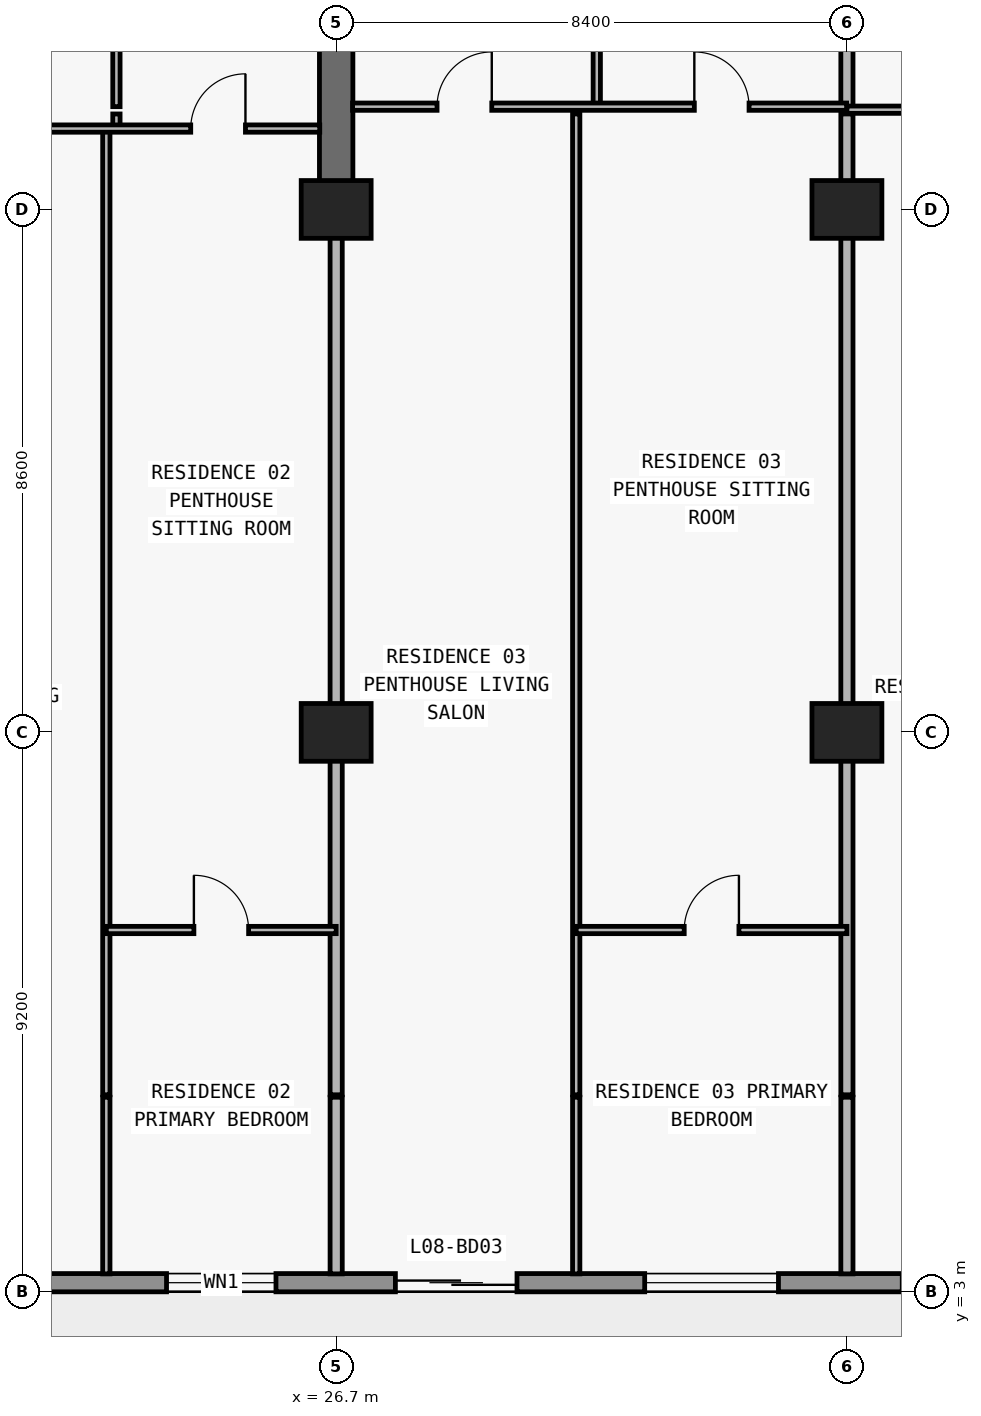
"""IFC4 building model, lengths in metres.
Left out: names, types, materials, properties, quantities, classifications, styles, units other than length and angle.
Written with IfcOpenShell. Run it as: python <this file> out.ifc"""

import sys

from ifc_helpers import new_model, si_unit, direction, frame, frame_2d, origin, origin_2d, place, context, subcontext, project, spatial, rectangle, extrude, element, fill, save


model = new_model("IFC4")
c1 = context("Model", 3, precision=1e-05, world=origin(), true_north=direction((0.0, 1.0)))
c2 = subcontext(c1, "Body", "Model", "MODEL_VIEW")
j1 = project(units=[si_unit("LENGTHUNIT", "METRE"), si_unit("PLANEANGLEUNIT", "RADIAN")], contexts=[c1])
p1 = place(None, origin())
s1 = spatial("IfcSite", under=j1, at=p1, CompositionType="ELEMENT")
p2 = place(p1, origin())
s2 = spatial("IfcBuilding", under=s1, at=p2, CompositionType="ELEMENT")
p3 = place(p2, frame((0.0, 0.0, 36.6)))
s3 = spatial("IfcBuildingStorey", under=s2, at=p3, CompositionType="ELEMENT", Elevation=36.6)
for number, where, z_axis, x_axis in (
    (1, (26.7, 12.2, 0.0), (0.0, 0.0, 1.0), (1.0, 0.0, 0.0)),
    (2, (35.1, 12.2, 0.0), (0.0, 0.0, 1.0), (1.0, 0.0, 0.0)),
    (3, (26.7, 20.8, 0.0), (0.0, 0.0, 1.0), (1.0, 0.0, 0.0)),
    (4, (35.1, 20.8, 0.0), (0.0, 0.0, 1.0), (1.0, 0.0, 0.0)),
):
    element("IfcColumn", number, at=place(p3, frame(where, z_axis=z_axis, x_axis=x_axis)), inside=s3, PredefinedType="COLUMN", context=c2, shape_type="SweptSolid", body=[
        extrude(rectangle(XDim=1.15, YDim=0.95, at=origin_2d()), origin(), (0.0, 0.0, 1.0), 3.05),
    ])
p4 = place(p3, frame((26.7, 20.8, 0.0), z_axis=(0.0, 0.0, 1.0), x_axis=(0.0, 1.0, 0.0)))
e5 = element("IfcWall", 5, at=p4, inside=s3, PredefinedType="SHEAR", context=c2, shape_type="SweptSolid", body=[
    extrude(rectangle(XDim=8.6, YDim=0.55, at=frame_2d((4.3, 0.0))), origin(), (0.0, 0.0, 1.0), 3.05),
])
p5 = place(p3, frame((72.7, 3.15, 0.0), z_axis=(0.0, 0.0, 1.0), x_axis=(-1.0, 0.0, 0.0)))
e6 = element("IfcWall", 6, at=p5, inside=s3, PredefinedType="STANDARD", context=c2, shape_type="SweptSolid", body=[
    extrude(rectangle(XDim=67.6, YDim=0.3, at=frame_2d((33.8, 0.0))), origin(), (0.0, 0.0, 1.0), 3.05),
])
p6 = place(p5, frame((59.826, 0.0, 0.0)))
e7 = element("IfcOpeningElement", 7, at=p6, cuts=e6, PredefinedType="OPENING", context=c2, shape_type="SweptSolid", body=[
    extrude(rectangle(XDim=2.0, YDim=2.3, at=frame_2d((1.0, 1.15))), frame((0.0, 0.16, 0.0), z_axis=(0.0, -1.0, 0.0), x_axis=(1.0, 0.0, 0.0)), (0.0, 0.0, 1.0), 0.32),
])
p7 = place(p5, frame((55.526, 0.0, 0.85)))
e8 = element("IfcOpeningElement", 8, at=p7, cuts=e6, PredefinedType="OPENING", context=c2, shape_type="SweptSolid", body=[
    extrude(rectangle(XDim=2.2, YDim=1.55, at=frame_2d((1.1, 0.775))), frame((0.0, 0.16, 0.0), z_axis=(0.0, -1.0, 0.0), x_axis=(1.0, 0.0, 0.0)), (0.0, 0.0, 1.0), 0.32),
])
p8 = place(p5, frame((51.09, 0.0, 0.0)))
e9 = element("IfcOpeningElement", 9, at=p8, cuts=e6, PredefinedType="OPENING", context=c2, shape_type="SweptSolid", body=[
    extrude(rectangle(XDim=2.0, YDim=2.3, at=frame_2d((1.0, 1.15))), frame((0.0, 0.16, 0.0), z_axis=(0.0, -1.0, 0.0), x_axis=(1.0, 0.0, 0.0)), (0.0, 0.0, 1.0), 0.32),
])
p9 = place(p5, frame((46.99, 0.0, 0.85)))
e10 = element("IfcOpeningElement", 10, at=p9, cuts=e6, PredefinedType="OPENING", context=c2, shape_type="SweptSolid", body=[
    extrude(rectangle(XDim=1.8, YDim=1.55, at=frame_2d((0.9, 0.775))), frame((0.0, 0.16, 0.0), z_axis=(0.0, -1.0, 0.0), x_axis=(1.0, 0.0, 0.0)), (0.0, 0.0, 1.0), 0.32),
])
p10 = place(p5, frame((43.026, 0.0, 0.0)))
e11 = element("IfcOpeningElement", 11, at=p10, cuts=e6, PredefinedType="OPENING", context=c2, shape_type="SweptSolid", body=[
    extrude(rectangle(XDim=2.0, YDim=2.3, at=frame_2d((1.0, 1.15))), frame((0.0, 0.16, 0.0), z_axis=(0.0, -1.0, 0.0), x_axis=(1.0, 0.0, 0.0)), (0.0, 0.0, 1.0), 0.32),
])
p11 = place(p5, frame((38.726, 0.0, 0.85)))
e12 = element("IfcOpeningElement", 12, at=p11, cuts=e6, PredefinedType="OPENING", context=c2, shape_type="SweptSolid", body=[
    extrude(rectangle(XDim=2.2, YDim=1.55, at=frame_2d((1.1, 0.775))), frame((0.0, 0.16, 0.0), z_axis=(0.0, -1.0, 0.0), x_axis=(1.0, 0.0, 0.0)), (0.0, 0.0, 1.0), 0.32),
])
p12 = place(p5, frame((34.69, 0.0, 0.0)))
e13 = element("IfcOpeningElement", 13, at=p12, cuts=e6, PredefinedType="OPENING", context=c2, shape_type="SweptSolid", body=[
    extrude(rectangle(XDim=2.0, YDim=2.3, at=frame_2d((1.0, 1.15))), frame((0.0, 0.16, 0.0), z_axis=(0.0, -1.0, 0.0), x_axis=(1.0, 0.0, 0.0)), (0.0, 0.0, 1.0), 0.32),
])
p13 = place(p5, frame((30.81, 0.0, 0.65)))
e14 = element("IfcOpeningElement", 14, at=p13, cuts=e6, PredefinedType="OPENING", context=c2, shape_type="SweptSolid", body=[
    extrude(rectangle(XDim=2.6, YDim=1.85, at=frame_2d((1.3, 0.925))), frame((0.0, 0.16, 0.0), z_axis=(0.0, -1.0, 0.0), x_axis=(1.0, 0.0, 0.0)), (0.0, 0.0, 1.0), 0.32),
])
p14 = place(p5, frame((24.7, 0.0, 0.85)))
e15 = element("IfcOpeningElement", 15, at=p14, cuts=e6, PredefinedType="OPENING", context=c2, shape_type="SweptSolid", body=[
    extrude(rectangle(XDim=2.2, YDim=1.55, at=frame_2d((1.1, 0.775))), frame((0.0, 0.16, 0.0), z_axis=(0.0, -1.0, 0.0), x_axis=(1.0, 0.0, 0.0)), (0.0, 0.0, 1.0), 0.32),
])
p15 = place(p5, frame((18.626, 0.0, 0.0)))
e16 = element("IfcOpeningElement", 16, at=p15, cuts=e6, PredefinedType="OPENING", context=c2, shape_type="SweptSolid", body=[
    extrude(rectangle(XDim=2.0, YDim=2.3, at=frame_2d((1.0, 1.15))), frame((0.0, 0.16, 0.0), z_axis=(0.0, -1.0, 0.0), x_axis=(1.0, 0.0, 0.0)), (0.0, 0.0, 1.0), 0.32),
])
p16 = place(p5, frame((14.326, 0.0, 0.85)))
e17 = element("IfcOpeningElement", 17, at=p16, cuts=e6, PredefinedType="OPENING", context=c2, shape_type="SweptSolid", body=[
    extrude(rectangle(XDim=2.2, YDim=1.55, at=frame_2d((1.1, 0.775))), frame((0.0, 0.16, 0.0), z_axis=(0.0, -1.0, 0.0), x_axis=(1.0, 0.0, 0.0)), (0.0, 0.0, 1.0), 0.32),
])
p17 = place(p5, frame((9.89, 0.0, 0.0)))
e18 = element("IfcOpeningElement", 18, at=p17, cuts=e6, PredefinedType="OPENING", context=c2, shape_type="SweptSolid", body=[
    extrude(rectangle(XDim=2.0, YDim=2.3, at=frame_2d((1.0, 1.15))), frame((0.0, 0.16, 0.0), z_axis=(0.0, -1.0, 0.0), x_axis=(1.0, 0.0, 0.0)), (0.0, 0.0, 1.0), 0.32),
])
p18 = place(p5, frame((5.79, 0.0, 0.85)))
e19 = element("IfcOpeningElement", 19, at=p18, cuts=e6, PredefinedType="OPENING", context=c2, shape_type="SweptSolid", body=[
    extrude(rectangle(XDim=1.8, YDim=1.55, at=frame_2d((0.9, 0.775))), frame((0.0, 0.16, 0.0), z_axis=(0.0, -1.0, 0.0), x_axis=(1.0, 0.0, 0.0)), (0.0, 0.0, 1.0), 0.32),
])
p19 = place(p3, frame((22.92, 3.295, 0.0), z_axis=(0.0, 0.0, 1.0), x_axis=(0.0, 1.0, 0.0)))
e20 = element("IfcWall", 20, at=p19, inside=s3, PredefinedType="PARTITIONING", context=c2, shape_type="SweptSolid", body=[
    extrude(rectangle(XDim=2.905, YDim=0.12, at=frame_2d((1.453, 0.0))), origin(), (0.0, 0.0, 1.0), 3.05),
])
p20 = place(p3, frame((22.92, 6.24, 0.0), z_axis=(0.0, 0.0, 1.0), x_axis=(0.0, 1.0, 0.0)))
e21 = element("IfcWall", 21, at=p20, inside=s3, PredefinedType="PARTITIONING", context=c2, shape_type="SweptSolid", body=[
    extrude(rectangle(XDim=15.89, YDim=0.12, at=frame_2d((7.945, 0.0))), origin(), (0.0, 0.0, 1.0), 3.05),
])
p21 = place(p3, frame((23.086, 22.135, 0.0), z_axis=(0.0, 0.0, 1.0), x_axis=(0.0, 1.0, 0.0)))
e22 = element("IfcWall", 22, at=p21, inside=s3, PredefinedType="PARTITIONING", context=c2, shape_type="SweptSolid", body=[
    extrude(rectangle(XDim=0.235, YDim=0.12, at=frame_2d((0.118, 0.0))), origin(), (0.0, 0.0, 1.0), 3.05),
])
p22 = place(p3, frame((23.086, 22.49, 0.0), z_axis=(0.0, 0.0, 1.0), x_axis=(0.0, 1.0, 0.0)))
e23 = element("IfcWall", 23, at=p22, inside=s3, PredefinedType="PARTITIONING", context=c2, shape_type="SweptSolid", body=[
    extrude(rectangle(XDim=4.69, YDim=0.12, at=frame_2d((2.345, 0.0))), origin(), (0.0, 0.0, 1.0), 3.05),
])
p23 = place(p22, frame((1.895, 0.0, 0.0)))
e24 = element("IfcOpeningElement", 24, at=p23, cuts=e23, PredefinedType="OPENING", context=c2, shape_type="SweptSolid", body=[
    extrude(rectangle(XDim=0.9, YDim=2.15, at=frame_2d((0.45, 1.075))), frame((0.0, 0.07, 0.0), z_axis=(0.0, -1.0, 0.0), x_axis=(1.0, 0.0, 0.0)), (0.0, 0.0, 1.0), 0.14),
])
p24 = place(p3, frame((26.7, 3.295, 0.0), z_axis=(0.0, 0.0, 1.0), x_axis=(0.0, 1.0, 0.0)))
e25 = element("IfcWall", 25, at=p24, inside=s3, PredefinedType="PARTITIONING", context=c2, shape_type="SweptSolid", body=[
    extrude(rectangle(XDim=2.905, YDim=0.2, at=frame_2d((1.453, 0.0))), origin(), (0.0, 0.0, 1.0), 3.05),
])
p25 = place(p3, frame((26.7, 6.24, 0.0), z_axis=(0.0, 0.0, 1.0), x_axis=(0.0, 1.0, 0.0)))
e26 = element("IfcWall", 26, at=p25, inside=s3, PredefinedType="PARTITIONING", context=c2, shape_type="SweptSolid", body=[
    extrude(rectangle(XDim=14.555, YDim=0.2, at=frame_2d((7.277, 0.0))), origin(), (0.0, 0.0, 1.0), 2.11),
])
p26 = place(p3, frame((30.648, 3.295, 0.0), z_axis=(0.0, 0.0, 1.0), x_axis=(0.0, 1.0, 0.0)))
e27 = element("IfcWall", 27, at=p26, inside=s3, PredefinedType="PARTITIONING", context=c2, shape_type="SweptSolid", body=[
    extrude(rectangle(XDim=2.905, YDim=0.12, at=frame_2d((1.453, 0.0))), origin(), (0.0, 0.0, 1.0), 3.05),
])
p27 = place(p3, frame((30.648, 6.24, 0.0), z_axis=(0.0, 0.0, 1.0), x_axis=(0.0, 1.0, 0.0)))
e28 = element("IfcWall", 28, at=p27, inside=s3, PredefinedType="PARTITIONING", context=c2, shape_type="SweptSolid", body=[
    extrude(rectangle(XDim=16.13, YDim=0.12, at=frame_2d((8.065, 0.0))), origin(), (0.0, 0.0, 1.0), 3.05),
])
p28 = place(p3, frame((30.986, 22.49, 0.0), z_axis=(0.0, 0.0, 1.0), x_axis=(0.0, 1.0, 0.0)))
e29 = element("IfcWall", 29, at=p28, inside=s3, PredefinedType="PARTITIONING", context=c2, shape_type="SweptSolid", body=[
    extrude(rectangle(XDim=4.69, YDim=0.12, at=frame_2d((2.345, 0.0))), origin(), (0.0, 0.0, 1.0), 3.05),
])
p29 = place(p28, frame((1.895, 0.0, 0.0)))
e30 = element("IfcOpeningElement", 30, at=p29, cuts=e29, PredefinedType="OPENING", context=c2, shape_type="SweptSolid", body=[
    extrude(rectangle(XDim=0.9, YDim=2.15, at=frame_2d((0.45, 1.075))), frame((0.0, 0.07, 0.0), z_axis=(0.0, -1.0, 0.0), x_axis=(1.0, 0.0, 0.0)), (0.0, 0.0, 1.0), 0.14),
])
p30 = place(p3, frame((35.1, 3.295, 0.0), z_axis=(0.0, 0.0, 1.0), x_axis=(0.0, 1.0, 0.0)))
e31 = element("IfcWall", 31, at=p30, inside=s3, PredefinedType="PARTITIONING", context=c2, shape_type="SweptSolid", body=[
    extrude(rectangle(XDim=2.905, YDim=0.2, at=frame_2d((1.453, 0.0))), origin(), (0.0, 0.0, 1.0), 3.05),
])
p31 = place(p3, frame((35.1, 6.24, 0.0), z_axis=(0.0, 0.0, 1.0), x_axis=(0.0, 1.0, 0.0)))
e32 = element("IfcWall", 32, at=p31, inside=s3, PredefinedType="PARTITIONING", context=c2, shape_type="SweptSolid", body=[
    extrude(rectangle(XDim=16.13, YDim=0.2, at=frame_2d((8.065, 0.0))), origin(), (0.0, 0.0, 1.0), 2.11),
])
p32 = place(p3, frame((35.1, 22.49, 0.0), z_axis=(0.0, 0.0, 1.0), x_axis=(0.0, 1.0, 0.0)))
e33 = element("IfcWall", 33, at=p32, inside=s3, PredefinedType="PARTITIONING", context=c2, shape_type="SweptSolid", body=[
    extrude(rectangle(XDim=4.69, YDim=0.2, at=frame_2d((2.345, 0.0))), origin(), (0.0, 0.0, 1.0), 2.11),
])
p33 = place(p3, frame((22.92, 8.95, 0.0), z_axis=(0.0, 0.0, 1.0), x_axis=(1.0, 0.0, 0.0)))
e34 = element("IfcWall", 34, at=p33, inside=s3, PredefinedType="PARTITIONING", context=c2, shape_type="SweptSolid", body=[
    extrude(rectangle(XDim=3.78, YDim=0.12, at=frame_2d((1.89, 0.0))), origin(), (0.0, 0.0, 1.0), 3.05),
])
p34 = place(p33, frame((1.44, 0.0, 0.0)))
e35 = element("IfcOpeningElement", 35, at=p34, cuts=e34, PredefinedType="OPENING", context=c2, shape_type="SweptSolid", body=[
    extrude(rectangle(XDim=0.9, YDim=2.15, at=frame_2d((0.45, 1.075))), frame((0.0, 0.07, 0.0), z_axis=(0.0, -1.0, 0.0), x_axis=(1.0, 0.0, 0.0)), (0.0, 0.0, 1.0), 0.14),
])
p35 = place(p3, frame((30.648, 8.95, 0.0), z_axis=(0.0, 0.0, 1.0), x_axis=(1.0, 0.0, 0.0)))
e36 = element("IfcWall", 36, at=p35, inside=s3, PredefinedType="PARTITIONING", context=c2, shape_type="SweptSolid", body=[
    extrude(rectangle(XDim=4.452, YDim=0.12, at=frame_2d((2.226, 0.0))), origin(), (0.0, 0.0, 1.0), 3.05),
])
p36 = place(p35, frame((1.776, 0.0, 0.0)))
e37 = element("IfcOpeningElement", 37, at=p36, cuts=e36, PredefinedType="OPENING", context=c2, shape_type="SweptSolid", body=[
    extrude(rectangle(XDim=0.9, YDim=2.15, at=frame_2d((0.45, 1.075))), frame((0.0, 0.07, 0.0), z_axis=(0.0, -1.0, 0.0), x_axis=(1.0, 0.0, 0.0)), (0.0, 0.0, 1.0), 0.14),
])
p37 = place(p3, frame((18.3, 22.13, 0.0), z_axis=(0.0, 0.0, 1.0), x_axis=(1.0, 0.0, 0.0)))
e38 = element("IfcWall", 38, at=p37, inside=s3, PredefinedType="PARTITIONING", context=c2, shape_type="SweptSolid", body=[
    extrude(rectangle(XDim=8.13, YDim=0.12, at=frame_2d((4.065, 0.0))), origin(), (0.0, 0.0, 1.0), 3.05),
])
p38 = place(p37, frame((1.86, 0.0, 0.0)))
e39 = element("IfcOpeningElement", 39, at=p38, cuts=e38, PredefinedType="OPENING", context=c2, shape_type="SweptSolid", body=[
    extrude(rectangle(XDim=0.9, YDim=2.15, at=frame_2d((0.45, 1.075))), frame((0.0, 0.07, 0.0), z_axis=(0.0, -1.0, 0.0), x_axis=(1.0, 0.0, 0.0)), (0.0, 0.0, 1.0), 0.14),
])
p39 = place(p37, frame((6.008, 0.0, 0.0)))
e40 = element("IfcOpeningElement", 40, at=p39, cuts=e38, PredefinedType="OPENING", context=c2, shape_type="SweptSolid", body=[
    extrude(rectangle(XDim=0.9, YDim=2.15, at=frame_2d((0.45, 1.075))), frame((0.0, 0.07, 0.0), z_axis=(0.0, -1.0, 0.0), x_axis=(1.0, 0.0, 0.0)), (0.0, 0.0, 1.0), 0.14),
])
p40 = place(p3, frame((35.1, 22.44, 0.0), z_axis=(0.0, 0.0, 1.0), x_axis=(1.0, 0.0, 0.0)))
e41 = element("IfcWall", 41, at=p40, inside=s3, PredefinedType="PARTITIONING", context=c2, shape_type="SweptSolid", body=[
    extrude(rectangle(XDim=7.6, YDim=0.12, at=frame_2d((3.8, 0.0))), origin(), (0.0, 0.0, 1.0), 3.05),
])
p41 = place(p40, frame((3.35, 0.0, 0.0)))
e42 = element("IfcOpeningElement", 42, at=p41, cuts=e41, PredefinedType="OPENING", context=c2, shape_type="SweptSolid", body=[
    extrude(rectangle(XDim=0.9, YDim=2.15, at=frame_2d((0.45, 1.075))), frame((0.0, 0.07, 0.0), z_axis=(0.0, -1.0, 0.0), x_axis=(1.0, 0.0, 0.0)), (0.0, 0.0, 1.0), 0.14),
])
p42 = place(p3, frame((26.97, 22.49, 0.0), z_axis=(0.0, 0.0, 1.0), x_axis=(1.0, 0.0, 0.0)))
e43 = element("IfcWall", 43, at=p42, inside=s3, PredefinedType="PARTITIONING", context=c2, shape_type="SweptSolid", body=[
    extrude(rectangle(XDim=8.125, YDim=0.12, at=frame_2d((4.062, 0.0))), origin(), (0.0, 0.0, 1.0), 3.05),
])
p43 = place(p42, frame((1.389, 0.0, 0.0)))
e44 = element("IfcOpeningElement", 44, at=p43, cuts=e43, PredefinedType="OPENING", context=c2, shape_type="SweptSolid", body=[
    extrude(rectangle(XDim=0.9, YDim=2.15, at=frame_2d((0.45, 1.075))), frame((0.0, 0.07, 0.0), z_axis=(0.0, -1.0, 0.0), x_axis=(1.0, 0.0, 0.0)), (0.0, 0.0, 1.0), 0.14),
])
p44 = place(p42, frame((5.621, 0.0, 0.0)))
e45 = element("IfcOpeningElement", 45, at=p44, cuts=e43, PredefinedType="OPENING", context=c2, shape_type="SweptSolid", body=[
    extrude(rectangle(XDim=0.9, YDim=2.15, at=frame_2d((0.45, 1.075))), frame((0.0, 0.07, 0.0), z_axis=(0.0, -1.0, 0.0), x_axis=(1.0, 0.0, 0.0)), (0.0, 0.0, 1.0), 0.14),
])
p45 = place(p9, origin())
e46 = element("IfcWindow", 46, at=p45, inside=s3, PartitioningType="SINGLE_PANEL", PredefinedType="WINDOW", context=c2, shape_type="SweptSolid", body=[
    extrude(rectangle(XDim=1.8, YDim=1.55, at=frame_2d((0.9, 0.775))), frame((0.0, 0.03, 0.0), z_axis=(0.0, -1.0, 0.0), x_axis=(1.0, 0.0, 0.0)), (0.0, 0.0, 1.0), 0.06),
])
fill(e10, e46)
p46 = place(p10, origin())
e47 = element("IfcDoor", 47, at=p46, inside=s3, OperationType="DOUBLE_DOOR_SLIDING", PredefinedType="DOOR", context=c2, shape_type="SweptSolid", body=[
    extrude(rectangle(XDim=2.0, YDim=2.3, at=frame_2d((1.0, 1.15))), frame((0.0, 0.025, 0.0), z_axis=(0.0, -1.0, 0.0), x_axis=(1.0, 0.0, 0.0)), (0.0, 0.0, 1.0), 0.05),
])
fill(e11, e47)
p47 = place(p11, origin())
e48 = element("IfcWindow", 48, at=p47, inside=s3, PartitioningType="SINGLE_PANEL", PredefinedType="WINDOW", context=c2, shape_type="SweptSolid", body=[
    extrude(rectangle(XDim=2.2, YDim=1.55, at=frame_2d((1.1, 0.775))), frame((0.0, 0.03, 0.0), z_axis=(0.0, -1.0, 0.0), x_axis=(1.0, 0.0, 0.0)), (0.0, 0.0, 1.0), 0.06),
])
fill(e12, e48)
p48 = place(p39, origin())
e49 = element("IfcDoor", 49, at=p48, inside=s3, OperationType="SINGLE_SWING_RIGHT", PredefinedType="DOOR", context=c2, shape_type="SweptSolid", body=[
    extrude(rectangle(XDim=0.9, YDim=2.15, at=frame_2d((0.45, 1.075))), frame((0.0, 0.025, 0.0), z_axis=(0.0, -1.0, 0.0), x_axis=(1.0, 0.0, 0.0)), (0.0, 0.0, 1.0), 0.05),
])
fill(e40, e49)
p49 = place(p34, origin())
e50 = element("IfcDoor", 50, at=p49, inside=s3, OperationType="SINGLE_SWING_LEFT", PredefinedType="DOOR", context=c2, shape_type="SweptSolid", body=[
    extrude(rectangle(XDim=0.9, YDim=2.15, at=frame_2d((0.45, 1.075))), frame((0.0, 0.025, 0.0), z_axis=(0.0, -1.0, 0.0), x_axis=(1.0, 0.0, 0.0)), (0.0, 0.0, 1.0), 0.05),
])
fill(e35, e50)
p50 = place(p43, origin())
e51 = element("IfcDoor", 51, at=p50, inside=s3, OperationType="SINGLE_SWING_RIGHT", PredefinedType="DOOR", context=c2, shape_type="SweptSolid", body=[
    extrude(rectangle(XDim=0.9, YDim=2.15, at=frame_2d((0.45, 1.075))), frame((0.0, 0.025, 0.0), z_axis=(0.0, -1.0, 0.0), x_axis=(1.0, 0.0, 0.0)), (0.0, 0.0, 1.0), 0.05),
])
fill(e44, e51)
p51 = place(p44, origin())
e52 = element("IfcDoor", 52, at=p51, inside=s3, OperationType="SINGLE_SWING_LEFT", PredefinedType="DOOR", context=c2, shape_type="SweptSolid", body=[
    extrude(rectangle(XDim=0.9, YDim=2.15, at=frame_2d((0.45, 1.075))), frame((0.0, 0.025, 0.0), z_axis=(0.0, -1.0, 0.0), x_axis=(1.0, 0.0, 0.0)), (0.0, 0.0, 1.0), 0.05),
])
fill(e45, e52)
p52 = place(p36, origin())
e53 = element("IfcDoor", 53, at=p52, inside=s3, OperationType="SINGLE_SWING_RIGHT", PredefinedType="DOOR", context=c2, shape_type="SweptSolid", body=[
    extrude(rectangle(XDim=0.9, YDim=2.15, at=frame_2d((0.45, 1.075))), frame((0.0, 0.025, 0.0), z_axis=(0.0, -1.0, 0.0), x_axis=(1.0, 0.0, 0.0)), (0.0, 0.0, 1.0), 0.05),
])
fill(e37, e53)
save(model, sys.argv[1])
